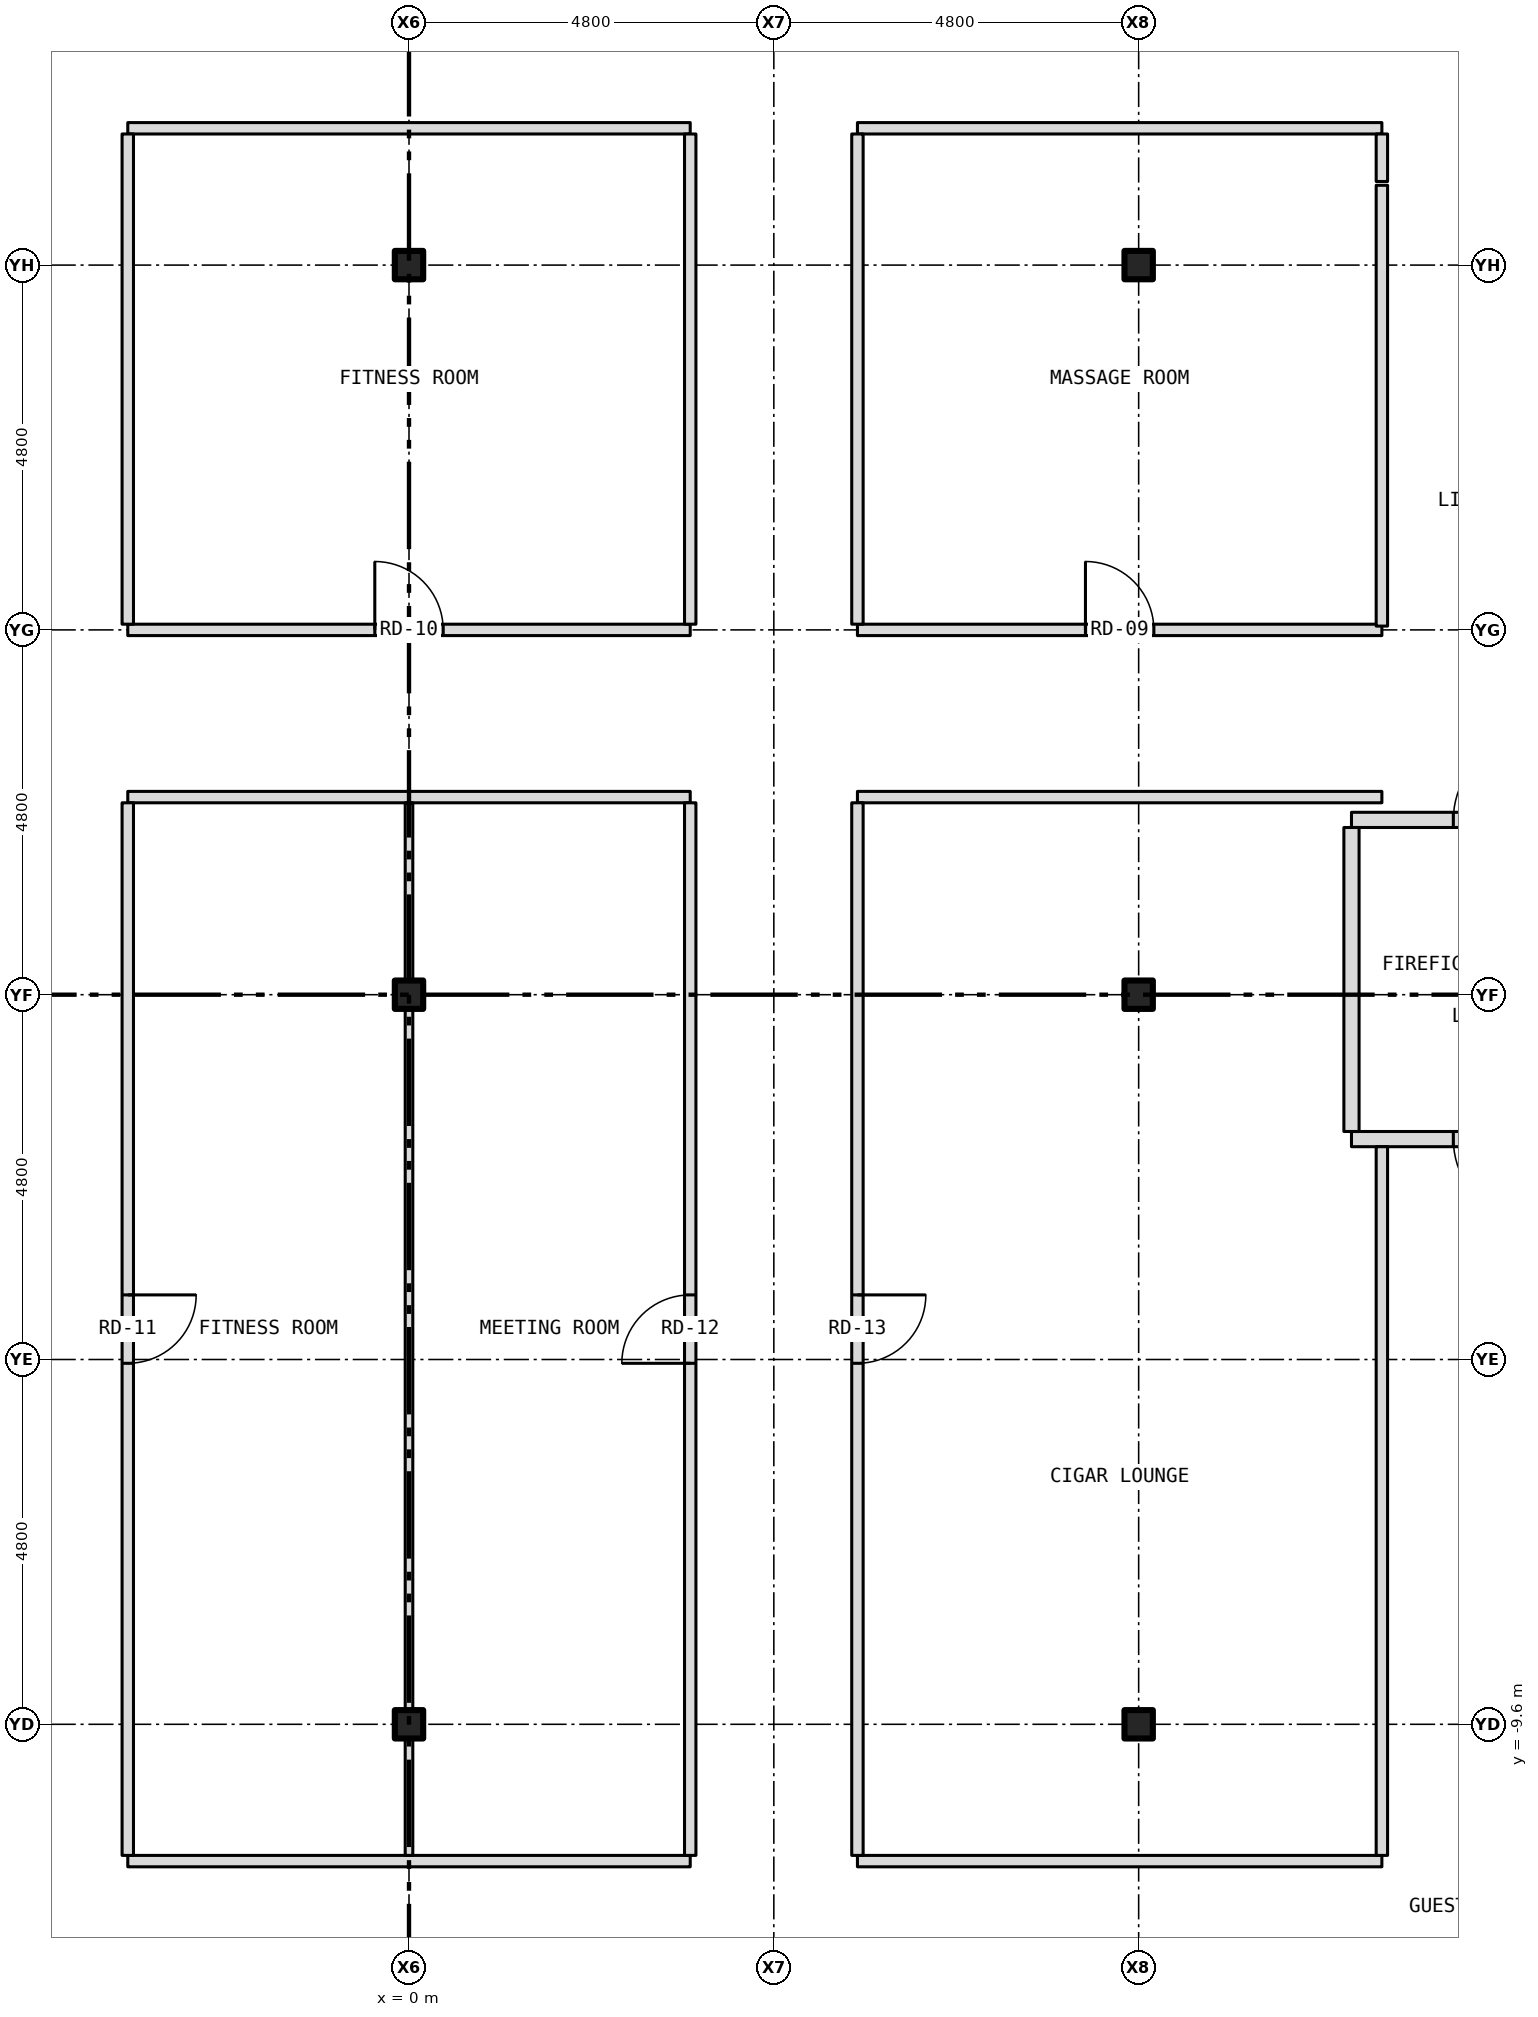
"""IFC4 building model, lengths in metres.
Left out: names, types, materials, properties, quantities, classifications, styles, units other than length and angle.
Written with IfcOpenShell. Run it as: python <this file> out.ifc"""

import sys

from ifc_helpers import new_model, si_unit, direction, frame, frame_2d, origin, origin_2d, place, context, subcontext, project, spatial, rectangle, i_section, extrude, element, fill, save


model = new_model("IFC4")
c1 = context("Model", 3, precision=1e-05, world=origin(), true_north=direction((0.0, 1.0)))
c2 = subcontext(c1, "Body", "Model", "MODEL_VIEW")
j1 = project(units=[si_unit("LENGTHUNIT", "METRE"), si_unit("PLANEANGLEUNIT", "RADIAN")], contexts=[c1])
p1 = place(None, origin())
s1 = spatial("IfcSite", under=j1, at=p1, CompositionType="ELEMENT")
p2 = place(p1, origin())
s2 = spatial("IfcBuilding", under=s1, at=p2, CompositionType="ELEMENT")
p3 = place(p2, frame((0.0, 0.0, 151.5)))
s3 = spatial("IfcBuildingStorey", under=s2, at=p3, CompositionType="ELEMENT", Elevation=151.5)
for number, where, z_axis, x_axis in (
    (1, (0.0, -9.6, -0.15), (0.0, 0.0, 1.0), (1.0, 0.0, 0.0)),
    (2, (0.0, 0.0, -0.15), (0.0, 0.0, 1.0), (1.0, 0.0, 0.0)),
    (3, (0.0, 9.6, -0.15), (0.0, 0.0, 1.0), (1.0, 0.0, 0.0)),
    (4, (9.6, -9.6, -0.15), (0.0, 0.0, 1.0), (1.0, 0.0, 0.0)),
    (5, (9.6, 0.0, -0.15), (0.0, 0.0, 1.0), (1.0, 0.0, 0.0)),
    (6, (9.6, 9.6, -0.15), (0.0, 0.0, 1.0), (1.0, 0.0, 0.0)),
):
    element("IfcColumn", number, at=place(p3, frame(where, z_axis=z_axis, x_axis=x_axis)), inside=s3, PredefinedType="COLUMN", context=c2, shape_type="SweptSolid", body=[
        extrude(i_section(OverallWidth=0.373, OverallDepth=0.373, WebThickness=0.016, FlangeThickness=0.026, at=origin_2d()), origin(), (0.0, 0.0, 1.0), 3.5),
    ])
p4 = place(p3, frame((-3.7, -11.4, 0.0), z_axis=(0.0, 0.0, 1.0), x_axis=(1.0, 0.0, 0.0)))
e7 = element("IfcWall", 7, at=p4, inside=s3, PredefinedType="PARTITIONING", context=c2, shape_type="SweptSolid", body=[
    extrude(rectangle(XDim=7.4, YDim=0.15, at=frame_2d((3.7, 0.0))), origin(), (0.0, 0.0, 1.0), 3.35),
])
p5 = place(p3, frame((5.9, -11.4, 0.0), z_axis=(0.0, 0.0, 1.0), x_axis=(1.0, 0.0, 0.0)))
e8 = element("IfcWall", 8, at=p5, inside=s3, PredefinedType="PARTITIONING", context=c2, shape_type="SweptSolid", body=[
    extrude(rectangle(XDim=6.9, YDim=0.15, at=frame_2d((3.45, 0.0))), origin(), (0.0, 0.0, 1.0), 3.35),
])
p6 = place(p3, frame((12.4, -1.9, 0.0), z_axis=(0.0, 0.0, 1.0), x_axis=(1.0, 0.0, 0.0)))
e9 = element("IfcWall", 9, at=p6, inside=s3, PredefinedType="PARTITIONING", context=c2, shape_type="SweptSolid", body=[
    extrude(rectangle(XDim=3.28, YDim=0.2, at=frame_2d((1.64, 0.0))), origin(), (0.0, 0.0, 1.0), 3.35),
])
p7 = place(p6, frame((1.34, 0.0, 0.0)))
e10 = element("IfcOpeningElement", 10, at=p7, cuts=e9, PredefinedType="OPENING", context=c2, shape_type="SweptSolid", body=[
    extrude(rectangle(XDim=1.1, YDim=2.1, at=frame_2d((0.55, 1.05))), frame((0.0, 0.112, 0.0), z_axis=(0.0, -1.0, 0.0), x_axis=(1.0, 0.0, 0.0)), (0.0, 0.0, 1.0), 0.224),
])
p8 = place(p3, frame((12.4, 2.3, 0.0), z_axis=(0.0, 0.0, 1.0), x_axis=(1.0, 0.0, 0.0)))
e11 = element("IfcWall", 11, at=p8, inside=s3, PredefinedType="PARTITIONING", context=c2, shape_type="SweptSolid", body=[
    extrude(rectangle(XDim=3.28, YDim=0.2, at=frame_2d((1.64, 0.0))), origin(), (0.0, 0.0, 1.0), 3.35),
])
p9 = place(p8, frame((1.34, 0.0, 0.0)))
e12 = element("IfcOpeningElement", 12, at=p9, cuts=e11, PredefinedType="OPENING", context=c2, shape_type="SweptSolid", body=[
    extrude(rectangle(XDim=1.1, YDim=2.1, at=frame_2d((0.55, 1.05))), frame((0.0, 0.112, 0.0), z_axis=(0.0, -1.0, 0.0), x_axis=(1.0, 0.0, 0.0)), (0.0, 0.0, 1.0), 0.224),
])
p10 = place(p3, frame((-3.7, 2.6, 0.0), z_axis=(0.0, 0.0, 1.0), x_axis=(1.0, 0.0, 0.0)))
e13 = element("IfcWall", 13, at=p10, inside=s3, PredefinedType="PARTITIONING", context=c2, shape_type="SweptSolid", body=[
    extrude(rectangle(XDim=7.4, YDim=0.15, at=frame_2d((3.7, 0.0))), origin(), (0.0, 0.0, 1.0), 3.35),
])
p11 = place(p3, frame((5.9, 2.6, 0.0), z_axis=(0.0, 0.0, 1.0), x_axis=(1.0, 0.0, 0.0)))
e14 = element("IfcWall", 14, at=p11, inside=s3, PredefinedType="PARTITIONING", context=c2, shape_type="SweptSolid", body=[
    extrude(rectangle(XDim=6.9, YDim=0.15, at=frame_2d((3.45, 0.0))), origin(), (0.0, 0.0, 1.0), 3.35),
])
p12 = place(p3, frame((-3.7, 4.8, 0.0), z_axis=(0.0, 0.0, 1.0), x_axis=(1.0, 0.0, 0.0)))
e15 = element("IfcWall", 15, at=p12, inside=s3, PredefinedType="PARTITIONING", context=c2, shape_type="SweptSolid", body=[
    extrude(rectangle(XDim=7.4, YDim=0.15, at=frame_2d((3.7, 0.0))), origin(), (0.0, 0.0, 1.0), 3.35),
])
p13 = place(p12, frame((3.25, 0.0, 0.0)))
e16 = element("IfcOpeningElement", 16, at=p13, cuts=e15, PredefinedType="OPENING", context=c2, shape_type="SweptSolid", body=[
    extrude(rectangle(XDim=0.9, YDim=2.1, at=frame_2d((0.45, 1.05))), frame((0.0, 0.087, 0.0), z_axis=(0.0, -1.0, 0.0), x_axis=(1.0, 0.0, 0.0)), (0.0, 0.0, 1.0), 0.174),
])
p14 = place(p3, frame((5.9, 4.8, 0.0), z_axis=(0.0, 0.0, 1.0), x_axis=(1.0, 0.0, 0.0)))
e17 = element("IfcWall", 17, at=p14, inside=s3, PredefinedType="PARTITIONING", context=c2, shape_type="SweptSolid", body=[
    extrude(rectangle(XDim=6.9, YDim=0.15, at=frame_2d((3.45, 0.0))), origin(), (0.0, 0.0, 1.0), 3.35),
])
p15 = place(p14, frame((3.0, 0.0, 0.0)))
e18 = element("IfcOpeningElement", 18, at=p15, cuts=e17, PredefinedType="OPENING", context=c2, shape_type="SweptSolid", body=[
    extrude(rectangle(XDim=0.9, YDim=2.1, at=frame_2d((0.45, 1.05))), frame((0.0, 0.087, 0.0), z_axis=(0.0, -1.0, 0.0), x_axis=(1.0, 0.0, 0.0)), (0.0, 0.0, 1.0), 0.174),
])
p16 = place(p3, frame((-3.7, 11.4, 0.0), z_axis=(0.0, 0.0, 1.0), x_axis=(1.0, 0.0, 0.0)))
e19 = element("IfcWall", 19, at=p16, inside=s3, PredefinedType="PARTITIONING", context=c2, shape_type="SweptSolid", body=[
    extrude(rectangle(XDim=7.4, YDim=0.15, at=frame_2d((3.7, 0.0))), origin(), (0.0, 0.0, 1.0), 3.35),
])
p17 = place(p3, frame((5.9, 11.4, 0.0), z_axis=(0.0, 0.0, 1.0), x_axis=(1.0, 0.0, 0.0)))
e20 = element("IfcWall", 20, at=p17, inside=s3, PredefinedType="PARTITIONING", context=c2, shape_type="SweptSolid", body=[
    extrude(rectangle(XDim=6.9, YDim=0.15, at=frame_2d((3.45, 0.0))), origin(), (0.0, 0.0, 1.0), 3.35),
])
p18 = place(p3, frame((-3.7, -11.325, 0.0), z_axis=(0.0, 0.0, 1.0), x_axis=(0.0, 1.0, 0.0)))
e21 = element("IfcWall", 21, at=p18, inside=s3, PredefinedType="PARTITIONING", context=c2, shape_type="SweptSolid", body=[
    extrude(rectangle(XDim=13.85, YDim=0.15, at=frame_2d((6.925, 0.0))), origin(), (0.0, 0.0, 1.0), 3.35),
])
p19 = place(p18, frame((6.475, 0.0, 0.0)))
e22 = element("IfcOpeningElement", 22, at=p19, cuts=e21, PredefinedType="OPENING", context=c2, shape_type="SweptSolid", body=[
    extrude(rectangle(XDim=0.9, YDim=2.1, at=frame_2d((0.45, 1.05))), frame((0.0, 0.087, 0.0), z_axis=(0.0, -1.0, 0.0), x_axis=(1.0, 0.0, 0.0)), (0.0, 0.0, 1.0), 0.174),
])
p20 = place(p3, frame((-3.7, 4.875, 0.0), z_axis=(0.0, 0.0, 1.0), x_axis=(0.0, 1.0, 0.0)))
e23 = element("IfcWall", 23, at=p20, inside=s3, PredefinedType="PARTITIONING", context=c2, shape_type="SweptSolid", body=[
    extrude(rectangle(XDim=6.45, YDim=0.15, at=frame_2d((3.225, 0.0))), origin(), (0.0, 0.0, 1.0), 3.35),
])
p21 = place(p3, frame((0.0, -11.325, 0.0), z_axis=(0.0, 0.0, 1.0), x_axis=(0.0, 1.0, 0.0)))
e24 = element("IfcWall", 24, at=p21, inside=s3, PredefinedType="PARTITIONING", context=c2, shape_type="SweptSolid", body=[
    extrude(rectangle(XDim=1.538, YDim=0.1, at=frame_2d((0.769, 0.0))), origin(), (0.0, 0.0, 1.0), 2.728),
])
p22 = place(p3, frame((0.0, -9.787, 0.0), z_axis=(0.0, 0.0, 1.0), x_axis=(0.0, 1.0, 0.0)))
e25 = element("IfcWall", 25, at=p22, inside=s3, PredefinedType="PARTITIONING", context=c2, shape_type="SweptSolid", body=[
    extrude(rectangle(XDim=0.374, YDim=0.1, at=frame_2d((0.187, 0.0))), origin(), (0.0, 0.0, 1.0), 3.35),
])
p23 = place(p3, frame((0.0, -9.413, 0.0), z_axis=(0.0, 0.0, 1.0), x_axis=(0.0, 1.0, 0.0)))
e26 = element("IfcWall", 26, at=p23, inside=s3, PredefinedType="PARTITIONING", context=c2, shape_type="SweptSolid", body=[
    extrude(rectangle(XDim=9.226, YDim=0.1, at=frame_2d((4.613, 0.0))), origin(), (0.0, 0.0, 1.0), 2.728),
])
p24 = place(p3, frame((0.0, -0.187, 0.0), z_axis=(0.0, 0.0, 1.0), x_axis=(0.0, 1.0, 0.0)))
e27 = element("IfcWall", 27, at=p24, inside=s3, PredefinedType="PARTITIONING", context=c2, shape_type="SweptSolid", body=[
    extrude(rectangle(XDim=0.374, YDim=0.1, at=frame_2d((0.187, 0.0))), origin(), (0.0, 0.0, 1.0), 3.35),
])
p25 = place(p3, frame((0.0, 0.187, 0.0), z_axis=(0.0, 0.0, 1.0), x_axis=(0.0, 1.0, 0.0)))
e28 = element("IfcWall", 28, at=p25, inside=s3, PredefinedType="PARTITIONING", context=c2, shape_type="SweptSolid", body=[
    extrude(rectangle(XDim=2.338, YDim=0.1, at=frame_2d((1.169, 0.0))), origin(), (0.0, 0.0, 1.0), 2.728),
])
p26 = place(p3, frame((3.7, -11.325, 0.0), z_axis=(0.0, 0.0, 1.0), x_axis=(0.0, 1.0, 0.0)))
e29 = element("IfcWall", 29, at=p26, inside=s3, PredefinedType="PARTITIONING", context=c2, shape_type="SweptSolid", body=[
    extrude(rectangle(XDim=13.85, YDim=0.15, at=frame_2d((6.925, 0.0))), origin(), (0.0, 0.0, 1.0), 3.35),
])
p27 = place(p26, frame((6.475, 0.0, 0.0)))
e30 = element("IfcOpeningElement", 30, at=p27, cuts=e29, PredefinedType="OPENING", context=c2, shape_type="SweptSolid", body=[
    extrude(rectangle(XDim=0.9, YDim=2.1, at=frame_2d((0.45, 1.05))), frame((0.0, 0.087, 0.0), z_axis=(0.0, -1.0, 0.0), x_axis=(1.0, 0.0, 0.0)), (0.0, 0.0, 1.0), 0.174),
])
p28 = place(p3, frame((3.7, 4.875, 0.0), z_axis=(0.0, 0.0, 1.0), x_axis=(0.0, 1.0, 0.0)))
e31 = element("IfcWall", 31, at=p28, inside=s3, PredefinedType="PARTITIONING", context=c2, shape_type="SweptSolid", body=[
    extrude(rectangle(XDim=6.45, YDim=0.15, at=frame_2d((3.225, 0.0))), origin(), (0.0, 0.0, 1.0), 3.35),
])
p29 = place(p3, frame((5.9, -11.325, 0.0), z_axis=(0.0, 0.0, 1.0), x_axis=(0.0, 1.0, 0.0)))
e32 = element("IfcWall", 32, at=p29, inside=s3, PredefinedType="PARTITIONING", context=c2, shape_type="SweptSolid", body=[
    extrude(rectangle(XDim=13.85, YDim=0.15, at=frame_2d((6.925, 0.0))), origin(), (0.0, 0.0, 1.0), 3.35),
])
p30 = place(p29, frame((6.475, 0.0, 0.0)))
e33 = element("IfcOpeningElement", 33, at=p30, cuts=e32, PredefinedType="OPENING", context=c2, shape_type="SweptSolid", body=[
    extrude(rectangle(XDim=0.9, YDim=2.1, at=frame_2d((0.45, 1.05))), frame((0.0, 0.087, 0.0), z_axis=(0.0, -1.0, 0.0), x_axis=(1.0, 0.0, 0.0)), (0.0, 0.0, 1.0), 0.174),
])
p31 = place(p3, frame((5.9, 4.875, 0.0), z_axis=(0.0, 0.0, 1.0), x_axis=(0.0, 1.0, 0.0)))
e34 = element("IfcWall", 34, at=p31, inside=s3, PredefinedType="PARTITIONING", context=c2, shape_type="SweptSolid", body=[
    extrude(rectangle(XDim=6.45, YDim=0.15, at=frame_2d((3.225, 0.0))), origin(), (0.0, 0.0, 1.0), 3.35),
])
p32 = place(p3, frame((12.4, -1.8, 0.0), z_axis=(0.0, 0.0, 1.0), x_axis=(0.0, 1.0, 0.0)))
e35 = element("IfcWall", 35, at=p32, inside=s3, PredefinedType="PARTITIONING", context=c2, shape_type="SweptSolid", body=[
    extrude(rectangle(XDim=4.0, YDim=0.2, at=frame_2d((2.0, 0.0))), origin(), (0.0, 0.0, 1.0), 3.35),
])
p33 = place(p3, frame((12.8, -11.325, 0.0), z_axis=(0.0, 0.0, 1.0), x_axis=(0.0, 1.0, 0.0)))
e36 = element("IfcWall", 36, at=p33, inside=s3, PredefinedType="PARTITIONING", context=c2, shape_type="SweptSolid", body=[
    extrude(rectangle(XDim=9.325, YDim=0.15, at=frame_2d((4.663, 0.0))), origin(), (0.0, 0.0, 1.0), 3.35),
])
p34 = place(p3, frame((12.8, 4.85, 0.0), z_axis=(0.0, 0.0, 1.0), x_axis=(0.0, 1.0, 0.0)))
e37 = element("IfcWall", 37, at=p34, inside=s3, PredefinedType="PARTITIONING", context=c2, shape_type="SweptSolid", body=[
    extrude(rectangle(XDim=5.8, YDim=0.15, at=frame_2d((2.9, 0.0))), origin(), (0.0, 0.0, 1.0), 3.35),
])
p35 = place(p3, frame((12.8, 10.7, 0.0), z_axis=(0.0, 0.0, 1.0), x_axis=(0.0, 1.0, 0.0)))
e38 = element("IfcWall", 38, at=p35, inside=s3, PredefinedType="PARTITIONING", context=c2, shape_type="SweptSolid", body=[
    extrude(rectangle(XDim=0.625, YDim=0.15, at=frame_2d((0.312, 0.0))), origin(), (0.0, 0.0, 1.0), 3.35),
])
p36 = place(p9, origin())
e39 = element("IfcDoor", 39, at=p36, inside=s3, OperationType="SINGLE_SWING_RIGHT", PredefinedType="DOOR", context=c2, shape_type="SweptSolid", body=[
    extrude(rectangle(XDim=1.1, YDim=2.1, at=frame_2d((0.55, 1.05))), frame((0.0, 0.025, 0.0), z_axis=(0.0, -1.0, 0.0), x_axis=(1.0, 0.0, 0.0)), (0.0, 0.0, 1.0), 0.05),
])
fill(e12, e39)
p37 = place(p7, origin())
e40 = element("IfcDoor", 40, at=p37, inside=s3, OperationType="SINGLE_SWING_RIGHT", PredefinedType="DOOR", context=c2, shape_type="SweptSolid", body=[
    extrude(rectangle(XDim=1.1, YDim=2.1, at=frame_2d((0.55, 1.05))), frame((0.0, 0.025, 0.0), z_axis=(0.0, -1.0, 0.0), x_axis=(1.0, 0.0, 0.0)), (0.0, 0.0, 1.0), 0.05),
])
fill(e10, e40)
p38 = place(p15, origin())
e41 = element("IfcDoor", 41, at=p38, inside=s3, OperationType="SINGLE_SWING_LEFT", PredefinedType="DOOR", context=c2, shape_type="SweptSolid", body=[
    extrude(rectangle(XDim=0.9, YDim=2.1, at=frame_2d((0.45, 1.05))), frame((0.0, 0.025, 0.0), z_axis=(0.0, -1.0, 0.0), x_axis=(1.0, 0.0, 0.0)), (0.0, 0.0, 1.0), 0.05),
])
fill(e18, e41)
p39 = place(p13, origin())
e42 = element("IfcDoor", 42, at=p39, inside=s3, OperationType="SINGLE_SWING_LEFT", PredefinedType="DOOR", context=c2, shape_type="SweptSolid", body=[
    extrude(rectangle(XDim=0.9, YDim=2.1, at=frame_2d((0.45, 1.05))), frame((0.0, 0.025, 0.0), z_axis=(0.0, -1.0, 0.0), x_axis=(1.0, 0.0, 0.0)), (0.0, 0.0, 1.0), 0.05),
])
fill(e16, e42)
p40 = place(p19, origin())
e43 = element("IfcDoor", 43, at=p40, inside=s3, OperationType="SINGLE_SWING_RIGHT", PredefinedType="DOOR", context=c2, shape_type="SweptSolid", body=[
    extrude(rectangle(XDim=0.9, YDim=2.1, at=frame_2d((0.45, 1.05))), frame((0.0, 0.025, 0.0), z_axis=(0.0, -1.0, 0.0), x_axis=(1.0, 0.0, 0.0)), (0.0, 0.0, 1.0), 0.05),
])
fill(e22, e43)
p41 = place(p27, origin())
e44 = element("IfcDoor", 44, at=p41, inside=s3, OperationType="SINGLE_SWING_LEFT", PredefinedType="DOOR", context=c2, shape_type="SweptSolid", body=[
    extrude(rectangle(XDim=0.9, YDim=2.1, at=frame_2d((0.45, 1.05))), frame((0.0, 0.025, 0.0), z_axis=(0.0, -1.0, 0.0), x_axis=(1.0, 0.0, 0.0)), (0.0, 0.0, 1.0), 0.05),
])
fill(e30, e44)
p42 = place(p30, origin())
e45 = element("IfcDoor", 45, at=p42, inside=s3, OperationType="SINGLE_SWING_RIGHT", PredefinedType="DOOR", context=c2, shape_type="SweptSolid", body=[
    extrude(rectangle(XDim=0.9, YDim=2.1, at=frame_2d((0.45, 1.05))), frame((0.0, 0.025, 0.0), z_axis=(0.0, -1.0, 0.0), x_axis=(1.0, 0.0, 0.0)), (0.0, 0.0, 1.0), 0.05),
])
fill(e33, e45)
save(model, sys.argv[1])
